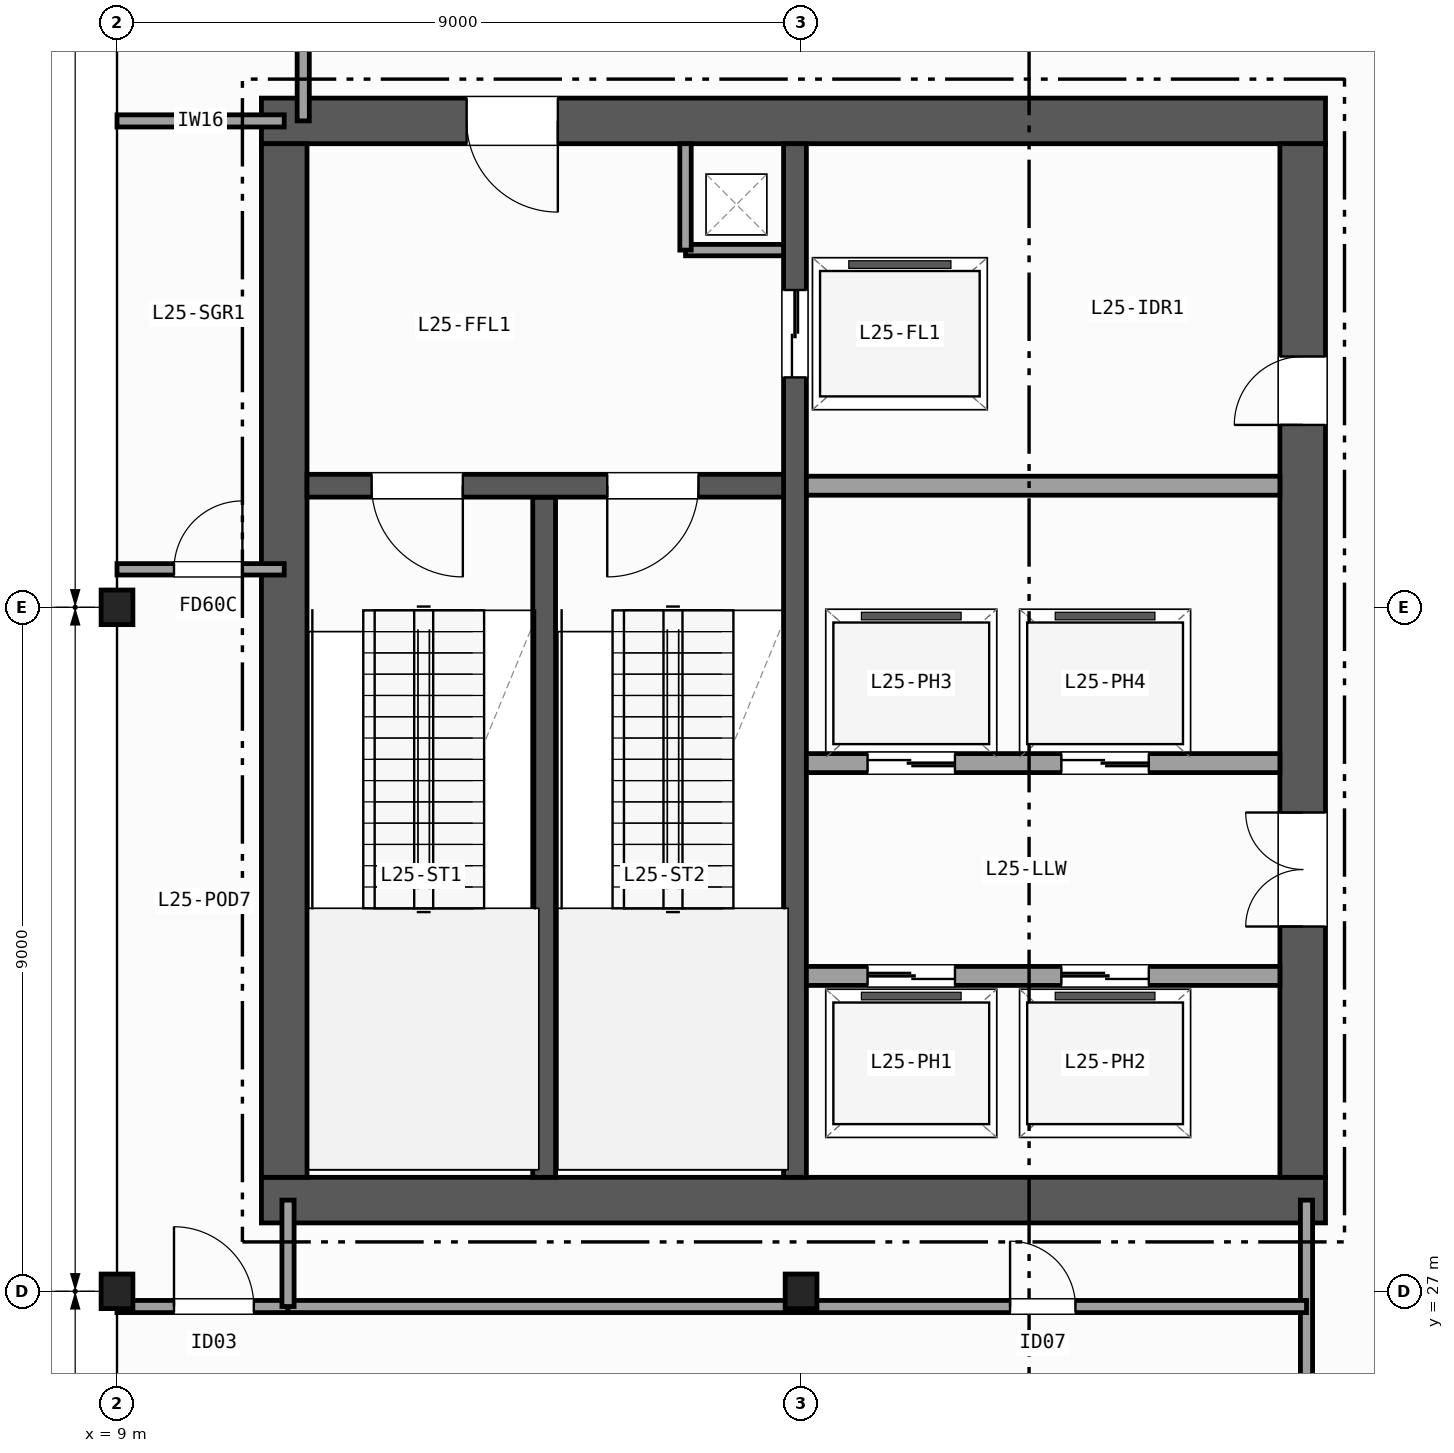
"""IFC4 building model, lengths in metres.
Left out: names, types, materials, properties, quantities, classifications, styles, units other than length and angle.
Written with IfcOpenShell. Run it as: python <this file> out.ifc"""

import sys

from ifc_helpers import new_model, si_unit, direction, frame, frame_2d, origin, origin_2d, place, context, subcontext, project, spatial, rectangle, i_section, extrude, element, fill, save


model = new_model("IFC4")
c1 = context("Model", 3, precision=1e-05, world=origin(), true_north=direction((0.0, 1.0)))
c2 = subcontext(c1, "Body", "Model", "MODEL_VIEW")
j1 = project(units=[si_unit("LENGTHUNIT", "METRE"), si_unit("PLANEANGLEUNIT", "RADIAN")], contexts=[c1])
p1 = place(None, origin())
s1 = spatial("IfcSite", under=j1, at=p1, CompositionType="ELEMENT")
p2 = place(p1, origin())
s2 = spatial("IfcBuilding", under=s1, at=p2, CompositionType="ELEMENT")
p3 = place(p2, frame((0.0, 0.0, 105.0)))
s3 = spatial("IfcBuildingStorey", under=s2, at=p3, CompositionType="ELEMENT", Elevation=105.0)
for number, where, z_axis, x_axis in (
    (1, (9.0, 27.0, 0.0), (0.0, 0.0, 1.0), (1.0, 0.0, 0.0)),
    (2, (9.0, 36.0, 0.0), (0.0, 0.0, 1.0), (1.0, 0.0, 0.0)),
    (3, (18.0, 27.0, 0.0), (0.0, 0.0, 1.0), (1.0, 0.0, 0.0)),
):
    element("IfcColumn", number, at=place(p3, frame(where, z_axis=z_axis, x_axis=x_axis)), inside=s3, PredefinedType="COLUMN", context=c2, shape_type="SweptSolid", body=[
        extrude(i_section(OverallWidth=0.418, OverallDepth=0.455, WebThickness=0.042, FlangeThickness=0.068, FilletRadius=0.015, at=origin_2d()), origin(), (0.0, 0.0, 1.0), 5.0),
    ])
p4 = place(p3, frame((10.9, 28.2, 0.0), z_axis=(0.0, 0.0, 1.0), x_axis=(1.0, 0.0, 0.0)))
e4 = element("IfcWall", 4, at=p4, inside=s3, PredefinedType="SHEAR", context=c2, shape_type="SweptSolid", body=[
    extrude(rectangle(XDim=14.0, YDim=0.6, at=frame_2d((7.0, 0.0))), origin(), (0.0, 0.0, 1.0), 4.72),
])
p5 = place(p3, frame((24.9, 42.4, 0.0), z_axis=(0.0, 0.0, 1.0), x_axis=(-1.0, 0.0, 0.0)))
e5 = element("IfcWall", 5, at=p5, inside=s3, PredefinedType="SHEAR", context=c2, shape_type="SweptSolid", body=[
    extrude(rectangle(XDim=14.0, YDim=0.6, at=frame_2d((7.0, 0.0))), origin(), (0.0, 0.0, 1.0), 4.72),
])
p6 = place(p5, frame((10.1, 0.0, 0.0)))
e6 = element("IfcOpeningElement", 6, at=p6, cuts=e5, PredefinedType="OPENING", context=c2, shape_type="SweptSolid", body=[
    extrude(rectangle(XDim=1.2, YDim=2.15, at=frame_2d((0.6, 1.075))), frame((0.0, 0.31, 0.0), z_axis=(0.0, -1.0, 0.0), x_axis=(1.0, 0.0, 0.0)), (0.0, 0.0, 1.0), 0.62),
])
p7 = place(p3, frame((11.2, 42.1, 0.0), z_axis=(0.0, 0.0, 1.0), x_axis=(0.0, -1.0, 0.0)))
e7 = element("IfcWall", 7, at=p7, inside=s3, PredefinedType="SHEAR", context=c2, shape_type="SweptSolid", body=[
    extrude(rectangle(XDim=13.6, YDim=0.6, at=frame_2d((6.8, 0.0))), origin(), (0.0, 0.0, 1.0), 4.72),
])
p8 = place(p3, frame((24.6, 28.5, 0.0), z_axis=(0.0, 0.0, 1.0), x_axis=(0.0, 1.0, 0.0)))
e8 = element("IfcWall", 8, at=p8, inside=s3, PredefinedType="SHEAR", context=c2, shape_type="SweptSolid", body=[
    extrude(rectangle(XDim=13.6, YDim=0.6, at=frame_2d((6.8, 0.0))), origin(), (0.0, 0.0, 1.0), 4.72),
])
p9 = place(p8, frame((3.3, 0.0, 0.0)))
e9 = element("IfcOpeningElement", 9, at=p9, cuts=e8, PredefinedType="OPENING", context=c2, shape_type="SweptSolid", body=[
    extrude(rectangle(XDim=1.5, YDim=2.2, at=frame_2d((0.75, 1.1))), frame((0.0, 0.31, 0.0), z_axis=(0.0, -1.0, 0.0), x_axis=(1.0, 0.0, 0.0)), (0.0, 0.0, 1.0), 0.62),
])
p10 = place(p8, frame((9.9, 0.0, 0.0)))
e10 = element("IfcOpeningElement", 10, at=p10, cuts=e8, PredefinedType="OPENING", context=c2, shape_type="SweptSolid", body=[
    extrude(rectangle(XDim=0.9, YDim=2.1, at=frame_2d((0.45, 1.05))), frame((0.0, 0.31, 0.0), z_axis=(0.0, -1.0, 0.0), x_axis=(1.0, 0.0, 0.0)), (0.0, 0.0, 1.0), 0.62),
])
p11 = place(p3, frame((14.62, 28.5, 0.0), z_axis=(0.0, 0.0, 1.0), x_axis=(0.0, 1.0, 0.0)))
e11 = element("IfcWall", 11, at=p11, inside=s3, PredefinedType="SHEAR", context=c2, shape_type="SweptSolid", body=[
    extrude(rectangle(XDim=8.95, YDim=0.3, at=frame_2d((4.475, 0.0))), origin(), (0.0, 0.0, 1.0), 4.72),
])
p12 = place(p3, frame((17.92, 42.1, 0.0), z_axis=(0.0, 0.0, 1.0), x_axis=(0.0, -1.0, 0.0)))
e12 = element("IfcWall", 12, at=p12, inside=s3, PredefinedType="SHEAR", context=c2, shape_type="SweptSolid", body=[
    extrude(rectangle(XDim=13.6, YDim=0.3, at=frame_2d((6.8, 0.0))), origin(), (0.0, 0.0, 1.0), 4.72),
])
p13 = place(p12, frame((1.925, 0.0, 0.0)))
e13 = element("IfcOpeningElement", 13, at=p13, cuts=e12, PredefinedType="OPENING", context=c2, shape_type="SweptSolid", body=[
    extrude(rectangle(XDim=1.15, YDim=2.15, at=frame_2d((0.575, 1.075))), frame((0.0, 0.16, 0.0), z_axis=(0.0, -1.0, 0.0), x_axis=(1.0, 0.0, 0.0)), (0.0, 0.0, 1.0), 0.32),
])
p14 = place(p3, frame((17.77, 37.6, 0.0), z_axis=(0.0, 0.0, 1.0), x_axis=(-1.0, 0.0, 0.0)))
e14 = element("IfcWall", 14, at=p14, inside=s3, PredefinedType="SHEAR", context=c2, shape_type="SweptSolid", body=[
    extrude(rectangle(XDim=6.27, YDim=0.3, at=frame_2d((3.135, 0.0))), origin(), (0.0, 0.0, 1.0), 4.72),
])
p15 = place(p14, frame((4.22, 0.0, 0.0)))
e15 = element("IfcOpeningElement", 15, at=p15, cuts=e14, PredefinedType="OPENING", context=c2, shape_type="SweptSolid", body=[
    extrude(rectangle(XDim=1.2, YDim=2.15, at=frame_2d((0.6, 1.075))), frame((0.0, 0.16, 0.0), z_axis=(0.0, -1.0, 0.0), x_axis=(1.0, 0.0, 0.0)), (0.0, 0.0, 1.0), 0.32),
])
p16 = place(p14, frame((1.12, 0.0, 0.0)))
e16 = element("IfcOpeningElement", 16, at=p16, cuts=e14, PredefinedType="OPENING", context=c2, shape_type="SweptSolid", body=[
    extrude(rectangle(XDim=1.2, YDim=2.15, at=frame_2d((0.6, 1.075))), frame((0.0, 0.16, 0.0), z_axis=(0.0, -1.0, 0.0), x_axis=(1.0, 0.0, 0.0)), (0.0, 0.0, 1.0), 0.32),
])
p17 = place(p3, frame((16.48, 40.7, 0.0), z_axis=(0.0, 0.0, 1.0), x_axis=(1.0, 0.0, 0.0)))
e17 = element("IfcWall", 17, at=p17, inside=s3, PredefinedType="PARTITIONING", context=c2, shape_type="SweptSolid", body=[
    extrude(rectangle(XDim=1.29, YDim=0.15, at=frame_2d((0.645, 0.0))), origin(), (0.0, 0.0, 1.0), 4.72),
])
p18 = place(p3, frame((16.48, 40.7, 0.0), z_axis=(0.0, 0.0, 1.0), x_axis=(0.0, 1.0, 0.0)))
e18 = element("IfcWall", 18, at=p18, inside=s3, PredefinedType="PARTITIONING", context=c2, shape_type="SweptSolid", body=[
    extrude(rectangle(XDim=1.4, YDim=0.15, at=frame_2d((0.7, 0.0))), origin(), (0.0, 0.0, 1.0), 4.72),
])
p19 = place(p3, frame((18.07, 37.6, 0.0), z_axis=(0.0, 0.0, 1.0), x_axis=(1.0, 0.0, 0.0)))
e19 = element("IfcWall", 19, at=p19, inside=s3, PredefinedType="PARTITIONING", context=c2, shape_type="SweptSolid", body=[
    extrude(rectangle(XDim=6.23, YDim=0.25, at=frame_2d((3.115, 0.0))), origin(), (0.0, 0.0, 1.0), 4.72),
])
p20 = place(p3, frame((18.07, 31.15, 0.0), z_axis=(0.0, 0.0, 1.0), x_axis=(1.0, 0.0, 0.0)))
e20 = element("IfcWall", 20, at=p20, inside=s3, PredefinedType="PARTITIONING", context=c2, shape_type="SweptSolid", body=[
    extrude(rectangle(XDim=6.23, YDim=0.25, at=frame_2d((3.115, 0.0))), origin(), (0.0, 0.0, 1.0), 4.72),
])
p21 = place(p20, frame((0.805, 0.0, 0.0)))
e21 = element("IfcOpeningElement", 21, at=p21, cuts=e20, PredefinedType="OPENING", context=c2, shape_type="SweptSolid", body=[
    extrude(rectangle(XDim=1.15, YDim=2.15, at=frame_2d((0.575, 1.075))), frame((0.0, 0.135, 0.0), z_axis=(0.0, -1.0, 0.0), x_axis=(1.0, 0.0, 0.0)), (0.0, 0.0, 1.0), 0.27),
])
p22 = place(p20, frame((3.355, 0.0, 0.0)))
e22 = element("IfcOpeningElement", 22, at=p22, cuts=e20, PredefinedType="OPENING", context=c2, shape_type="SweptSolid", body=[
    extrude(rectangle(XDim=1.15, YDim=2.15, at=frame_2d((0.575, 1.075))), frame((0.0, 0.135, 0.0), z_axis=(0.0, -1.0, 0.0), x_axis=(1.0, 0.0, 0.0)), (0.0, 0.0, 1.0), 0.27),
])
p23 = place(p3, frame((24.3, 33.95, 0.0), z_axis=(0.0, 0.0, 1.0), x_axis=(-1.0, 0.0, 0.0)))
e23 = element("IfcWall", 23, at=p23, inside=s3, PredefinedType="PARTITIONING", context=c2, shape_type="SweptSolid", body=[
    extrude(rectangle(XDim=6.23, YDim=0.25, at=frame_2d((3.115, 0.0))), origin(), (0.0, 0.0, 1.0), 4.72),
])
p24 = place(p23, frame((4.275, 0.0, 0.0)))
e24 = element("IfcOpeningElement", 24, at=p24, cuts=e23, PredefinedType="OPENING", context=c2, shape_type="SweptSolid", body=[
    extrude(rectangle(XDim=1.15, YDim=2.15, at=frame_2d((0.575, 1.075))), frame((0.0, 0.135, 0.0), z_axis=(0.0, -1.0, 0.0), x_axis=(1.0, 0.0, 0.0)), (0.0, 0.0, 1.0), 0.27),
])
p25 = place(p23, frame((1.725, 0.0, 0.0)))
e25 = element("IfcOpeningElement", 25, at=p25, cuts=e23, PredefinedType="OPENING", context=c2, shape_type="SweptSolid", body=[
    extrude(rectangle(XDim=1.15, YDim=2.15, at=frame_2d((0.575, 1.075))), frame((0.0, 0.135, 0.0), z_axis=(0.0, -1.0, 0.0), x_axis=(1.0, 0.0, 0.0)), (0.0, 0.0, 1.0), 0.27),
])
p26 = place(p3, frame((9.0, 26.8, 0.0), z_axis=(0.0, 0.0, 1.0), x_axis=(1.0, 0.0, 0.0)))
e26 = element("IfcWall", 26, at=p26, inside=s3, PredefinedType="PARTITIONING", context=c2, shape_type="SweptSolid", body=[
    extrude(rectangle(XDim=2.25, YDim=0.16, at=frame_2d((1.125, 0.0))), origin(), (0.0, 0.0, 1.0), 3.934),
])
p27 = place(p26, frame((0.75, 0.0, 0.0)))
e27 = element("IfcOpeningElement", 27, at=p27, cuts=e26, PredefinedType="OPENING", context=c2, shape_type="SweptSolid", body=[
    extrude(rectangle(XDim=1.05, YDim=2.15, at=frame_2d((0.525, 1.075))), frame((0.0, 0.09, 0.0), z_axis=(0.0, -1.0, 0.0), x_axis=(1.0, 0.0, 0.0)), (0.0, 0.0, 1.0), 0.18),
])
p28 = place(p3, frame((9.0, 42.4, 0.0), z_axis=(0.0, 0.0, 1.0), x_axis=(1.0, 0.0, 0.0)))
e28 = element("IfcWall", 28, at=p28, inside=s3, PredefinedType="PARTITIONING", context=c2, shape_type="SweptSolid", body=[
    extrude(rectangle(XDim=2.2, YDim=0.16, at=frame_2d((1.1, 0.0))), origin(), (0.0, 0.0, 1.0), 3.934),
])
p29 = place(p3, frame((11.45, 42.4, 0.0), z_axis=(0.0, 0.0, 1.0), x_axis=(0.0, 1.0, 0.0)))
e29 = element("IfcWall", 29, at=p29, inside=s3, PredefinedType="PARTITIONING", context=c2, shape_type="SweptSolid", body=[
    extrude(rectangle(XDim=2.1, YDim=0.16, at=frame_2d((1.05, 0.0))), origin(), (0.0, 0.0, 1.0), 4.72),
])
p30 = place(p3, frame((9.0, 36.5, 0.0), z_axis=(0.0, 0.0, 1.0), x_axis=(1.0, 0.0, 0.0)))
e30 = element("IfcWall", 30, at=p30, inside=s3, PredefinedType="PARTITIONING", context=c2, shape_type="SweptSolid", body=[
    extrude(rectangle(XDim=2.2, YDim=0.15, at=frame_2d((1.1, 0.0))), origin(), (0.0, 0.0, 1.0), 3.934),
])
p31 = place(p30, frame((0.75, 0.0, 0.0)))
e31 = element("IfcOpeningElement", 31, at=p31, cuts=e30, PredefinedType="OPENING", context=c2, shape_type="SweptSolid", body=[
    extrude(rectangle(XDim=0.9, YDim=2.1, at=frame_2d((0.45, 1.05))), frame((0.0, 0.085, 0.0), z_axis=(0.0, -1.0, 0.0), x_axis=(1.0, 0.0, 0.0)), (0.0, 0.0, 1.0), 0.17),
])
p32 = place(p3, frame((24.65, 9.0, 0.0), z_axis=(0.0, 0.0, 1.0), x_axis=(0.0, 1.0, 0.0)))
e32 = element("IfcWall", 32, at=p32, inside=s3, PredefinedType="PARTITIONING", context=c2, shape_type="SweptSolid", body=[
    extrude(rectangle(XDim=19.2, YDim=0.16, at=frame_2d((9.6, 0.0))), origin(), (0.0, 0.0, 1.0), 3.934),
])
p33 = place(p32, frame((12.2, 0.0, 0.0)))
e33 = element("IfcOpeningElement", 33, at=p33, cuts=e32, PredefinedType="OPENING", context=c2, shape_type="SweptSolid", body=[
    extrude(rectangle(XDim=0.95, YDim=2.1, at=frame_2d((0.475, 1.05))), frame((0.0, 0.09, 0.0), z_axis=(0.0, -1.0, 0.0), x_axis=(1.0, 0.0, 0.0)), (0.0, 0.0, 1.0), 0.18),
])
p34 = place(p32, frame((4.2, 0.0, 0.0)))
e34 = element("IfcOpeningElement", 34, at=p34, cuts=e32, PredefinedType="OPENING", context=c2, shape_type="SweptSolid", body=[
    extrude(rectangle(XDim=1.0, YDim=2.1, at=frame_2d((0.5, 1.05))), frame((0.0, 0.09, 0.0), z_axis=(0.0, -1.0, 0.0), x_axis=(1.0, 0.0, 0.0)), (0.0, 0.0, 1.0), 0.18),
])
p35 = place(p3, frame((11.25, 26.8, 0.0), z_axis=(0.0, 0.0, 1.0), x_axis=(1.0, 0.0, 0.0)))
e35 = element("IfcWall", 35, at=p35, inside=s3, PredefinedType="PARTITIONING", context=c2, shape_type="SweptSolid", body=[
    extrude(rectangle(XDim=13.4, YDim=0.16, at=frame_2d((6.7, 0.0))), origin(), (0.0, 0.0, 1.0), 4.089),
])
p36 = place(p35, frame((9.5, 0.0, 0.0)))
e36 = element("IfcOpeningElement", 36, at=p36, cuts=e35, PredefinedType="OPENING", context=c2, shape_type="SweptSolid", body=[
    extrude(rectangle(XDim=0.86, YDim=2.05, at=frame_2d((0.43, 1.025))), frame((0.0, 0.09, 0.0), z_axis=(0.0, -1.0, 0.0), x_axis=(1.0, 0.0, 0.0)), (0.0, 0.0, 1.0), 0.18),
])
p37 = place(p3, frame((11.25, 26.8, 0.0), z_axis=(0.0, 0.0, 1.0), x_axis=(0.0, 1.0, 0.0)))
e37 = element("IfcWall", 37, at=p37, inside=s3, PredefinedType="PARTITIONING", context=c2, shape_type="SweptSolid", body=[
    extrude(rectangle(XDim=1.4, YDim=0.16, at=frame_2d((0.7, 0.0))), origin(), (0.0, 0.0, 1.0), 4.089),
])
p38 = place(p15, origin())
e38 = element("IfcDoor", 38, at=p38, inside=s3, OperationType="SINGLE_SWING_LEFT", PredefinedType="DOOR", context=c2, shape_type="SweptSolid", body=[
    extrude(rectangle(XDim=1.2, YDim=2.15, at=frame_2d((0.6, 1.075))), frame((0.0, 0.025, 0.0), z_axis=(0.0, -1.0, 0.0), x_axis=(1.0, 0.0, 0.0)), (0.0, 0.0, 1.0), 0.05),
])
fill(e15, e38)
p39 = place(p16, origin())
e39 = element("IfcDoor", 39, at=p39, inside=s3, OperationType="SINGLE_SWING_RIGHT", PredefinedType="DOOR", context=c2, shape_type="SweptSolid", body=[
    extrude(rectangle(XDim=1.2, YDim=2.15, at=frame_2d((0.6, 1.075))), frame((0.0, 0.025, 0.0), z_axis=(0.0, -1.0, 0.0), x_axis=(1.0, 0.0, 0.0)), (0.0, 0.0, 1.0), 0.05),
])
fill(e16, e39)
p40 = place(p9, origin())
e40 = element("IfcDoor", 40, at=p40, inside=s3, OperationType="DOUBLE_DOOR_SINGLE_SWING", PredefinedType="DOOR", context=c2, shape_type="SweptSolid", body=[
    extrude(rectangle(XDim=1.5, YDim=2.2, at=frame_2d((0.75, 1.1))), frame((0.0, 0.025, 0.0), z_axis=(0.0, -1.0, 0.0), x_axis=(1.0, 0.0, 0.0)), (0.0, 0.0, 1.0), 0.05),
])
fill(e9, e40)
p41 = place(p6, origin())
e41 = element("IfcDoor", 41, at=p41, inside=s3, OperationType="SINGLE_SWING_LEFT", PredefinedType="DOOR", context=c2, shape_type="SweptSolid", body=[
    extrude(rectangle(XDim=1.2, YDim=2.15, at=frame_2d((0.6, 1.075))), frame((0.0, 0.025, 0.0), z_axis=(0.0, -1.0, 0.0), x_axis=(1.0, 0.0, 0.0)), (0.0, 0.0, 1.0), 0.05),
])
fill(e6, e41)
p42 = place(p10, origin())
e42 = element("IfcDoor", 42, at=p42, inside=s3, OperationType="SINGLE_SWING_LEFT", PredefinedType="DOOR", context=c2, shape_type="SweptSolid", body=[
    extrude(rectangle(XDim=0.9, YDim=2.1, at=frame_2d((0.45, 1.05))), frame((0.0, 0.025, 0.0), z_axis=(0.0, -1.0, 0.0), x_axis=(1.0, 0.0, 0.0)), (0.0, 0.0, 1.0), 0.05),
])
fill(e10, e42)
p43 = place(p13, origin())
e43 = element("IfcDoor", 43, at=p43, inside=s3, OperationType="DOUBLE_DOOR_SLIDING", PredefinedType="DOOR", context=c2, shape_type="SweptSolid", body=[
    extrude(rectangle(XDim=1.15, YDim=2.15, at=frame_2d((0.575, 1.075))), frame((0.0, 0.025, 0.0), z_axis=(0.0, -1.0, 0.0), x_axis=(1.0, 0.0, 0.0)), (0.0, 0.0, 1.0), 0.05),
])
fill(e13, e43)
p44 = place(p21, origin())
e44 = element("IfcDoor", 44, at=p44, inside=s3, OperationType="DOUBLE_DOOR_SLIDING", PredefinedType="DOOR", context=c2, shape_type="SweptSolid", body=[
    extrude(rectangle(XDim=1.15, YDim=2.15, at=frame_2d((0.575, 1.075))), frame((0.0, 0.025, 0.0), z_axis=(0.0, -1.0, 0.0), x_axis=(1.0, 0.0, 0.0)), (0.0, 0.0, 1.0), 0.05),
])
fill(e21, e44)
p45 = place(p22, origin())
e45 = element("IfcDoor", 45, at=p45, inside=s3, OperationType="DOUBLE_DOOR_SLIDING", PredefinedType="DOOR", context=c2, shape_type="SweptSolid", body=[
    extrude(rectangle(XDim=1.15, YDim=2.15, at=frame_2d((0.575, 1.075))), frame((0.0, 0.025, 0.0), z_axis=(0.0, -1.0, 0.0), x_axis=(1.0, 0.0, 0.0)), (0.0, 0.0, 1.0), 0.05),
])
fill(e22, e45)
p46 = place(p24, origin())
e46 = element("IfcDoor", 46, at=p46, inside=s3, OperationType="DOUBLE_DOOR_SLIDING", PredefinedType="DOOR", context=c2, shape_type="SweptSolid", body=[
    extrude(rectangle(XDim=1.15, YDim=2.15, at=frame_2d((0.575, 1.075))), frame((0.0, 0.025, 0.0), z_axis=(0.0, -1.0, 0.0), x_axis=(1.0, 0.0, 0.0)), (0.0, 0.0, 1.0), 0.05),
])
fill(e24, e46)
p47 = place(p25, origin())
e47 = element("IfcDoor", 47, at=p47, inside=s3, OperationType="DOUBLE_DOOR_SLIDING", PredefinedType="DOOR", context=c2, shape_type="SweptSolid", body=[
    extrude(rectangle(XDim=1.15, YDim=2.15, at=frame_2d((0.575, 1.075))), frame((0.0, 0.025, 0.0), z_axis=(0.0, -1.0, 0.0), x_axis=(1.0, 0.0, 0.0)), (0.0, 0.0, 1.0), 0.05),
])
fill(e25, e47)
p48 = place(p27, origin())
e48 = element("IfcDoor", 48, at=p48, inside=s3, OperationType="SINGLE_SWING_LEFT", PredefinedType="DOOR", context=c2, shape_type="SweptSolid", body=[
    extrude(rectangle(XDim=1.05, YDim=2.15, at=frame_2d((0.525, 1.075))), frame((0.0, 0.025, 0.0), z_axis=(0.0, -1.0, 0.0), x_axis=(1.0, 0.0, 0.0)), (0.0, 0.0, 1.0), 0.05),
])
fill(e27, e48)
p49 = place(p31, origin())
e49 = element("IfcDoor", 49, at=p49, inside=s3, OperationType="SINGLE_SWING_RIGHT", PredefinedType="DOOR", context=c2, shape_type="SweptSolid", body=[
    extrude(rectangle(XDim=0.9, YDim=2.1, at=frame_2d((0.45, 1.05))), frame((0.0, 0.025, 0.0), z_axis=(0.0, -1.0, 0.0), x_axis=(1.0, 0.0, 0.0)), (0.0, 0.0, 1.0), 0.05),
])
fill(e31, e49)
p50 = place(p36, origin())
e50 = element("IfcDoor", 50, at=p50, inside=s3, OperationType="SINGLE_SWING_LEFT", PredefinedType="DOOR", context=c2, shape_type="SweptSolid", body=[
    extrude(rectangle(XDim=0.86, YDim=2.05, at=frame_2d((0.43, 1.025))), frame((0.0, 0.025, 0.0), z_axis=(0.0, -1.0, 0.0), x_axis=(1.0, 0.0, 0.0)), (0.0, 0.0, 1.0), 0.05),
])
fill(e36, e50)
save(model, sys.argv[1])
